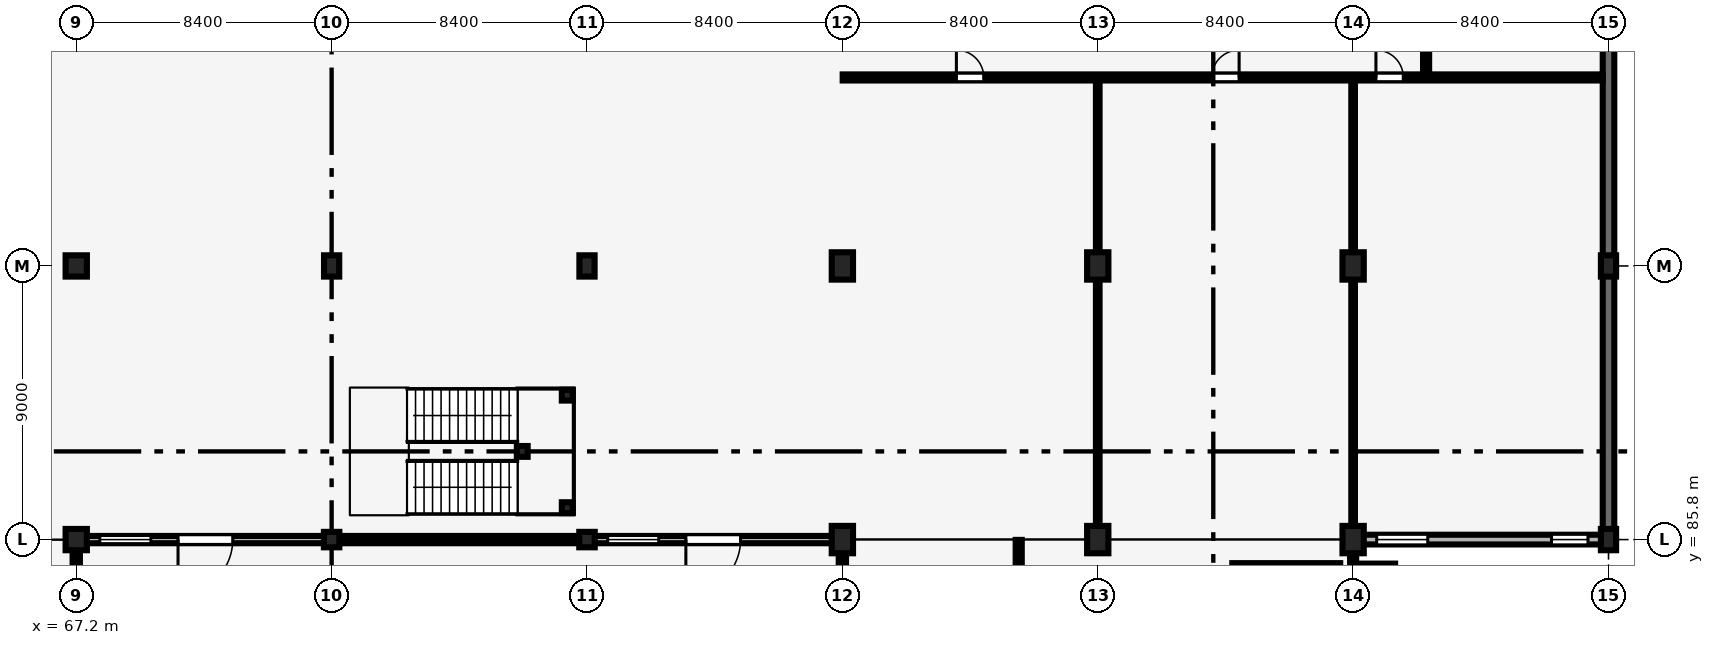
"""IFC4 building model, lengths in metres.
Left out: names, types, materials, properties, quantities, classifications, styles, units other than length and angle.
Written with IfcOpenShell. Run it as: python <this file> out.ifc"""

import sys

from ifc_helpers import new_model, si_unit, direction, frame, frame_2d, origin, origin_2d, place, context, subcontext, project, spatial, rectangle, hollow_circle, extrude, element, fill, save


model = new_model("IFC4")
c1 = context("Model", 3, precision=1e-05, world=origin(), true_north=direction((0.0, 1.0)))
c2 = subcontext(c1, "Body", "Model", "MODEL_VIEW")
j1 = project(units=[si_unit("LENGTHUNIT", "METRE"), si_unit("PLANEANGLEUNIT", "RADIAN")], contexts=[c1])
p1 = place(None, origin())
s1 = spatial("IfcSite", under=j1, at=p1, CompositionType="ELEMENT")
p2 = place(p1, origin())
s2 = spatial("IfcBuilding", under=s1, at=p2, CompositionType="ELEMENT")
p3 = place(p2, origin())
s3 = spatial("IfcBuildingStorey", under=s2, at=p3, CompositionType="ELEMENT", Elevation=0.0)
for number, where, z_axis, x_axis in (
    (1, (67.2, 85.8, 0.0), (0.0, 0.0, 1.0), (1.0, 0.0, 0.0)),
    (2, (67.2, 94.8, 0.0), (0.0, 0.0, 1.0), (1.0, 0.0, 0.0)),
):
    element("IfcColumn", number, at=place(p3, frame(where, z_axis=z_axis, x_axis=x_axis)), inside=s3, PredefinedType="COLUMN", context=c2, shape_type="SweptSolid", body=[
        extrude(rectangle(XDim=0.7, YDim=0.7, at=origin_2d()), origin(), (0.0, 0.0, 1.0), 4.8),
    ])
for number, where, z_axis, x_axis in (
    (3, (75.6, 94.8, 0.0), (0.0, 0.0, 1.0), (1.0, 0.0, 0.0)),
    (4, (84.0, 94.8, 0.0), (0.0, 0.0, 1.0), (1.0, 0.0, 0.0)),
):
    element("IfcColumn", number, at=place(p3, frame(where, z_axis=z_axis, x_axis=x_axis)), inside=s3, PredefinedType="COLUMN", context=c2, shape_type="SweptSolid", body=[
        extrude(rectangle(XDim=0.5, YDim=0.7, at=origin_2d()), origin(), (0.0, 0.0, 1.0), 4.8),
    ])
for number, where, z_axis, x_axis in (
    (5, (92.4, 85.8, 0.0), (0.0, 0.0, 1.0), (1.0, 0.0, 0.0)),
    (6, (92.4, 94.8, 0.0), (0.0, 0.0, 1.0), (1.0, 0.0, 0.0)),
    (7, (100.8, 85.8, 0.0), (0.0, 0.0, 1.0), (1.0, 0.0, 0.0)),
    (8, (100.8, 94.8, 0.0), (0.0, 0.0, 1.0), (1.0, 0.0, 0.0)),
    (9, (109.2, 85.8, 0.0), (0.0, 0.0, 1.0), (1.0, 0.0, 0.0)),
    (10, (109.2, 94.8, 0.0), (0.0, 0.0, 1.0), (1.0, 0.0, 0.0)),
):
    element("IfcColumn", number, at=place(p3, frame(where, z_axis=z_axis, x_axis=x_axis)), inside=s3, PredefinedType="COLUMN", context=c2, shape_type="SweptSolid", body=[
        extrude(rectangle(XDim=0.7, YDim=0.9, at=origin_2d()), origin(), (0.0, 0.0, 1.0), 4.8),
    ])
for number, where, z_axis, x_axis in (
    (11, (117.6, 85.8, 0.0), (0.0, 0.0, 1.0), (1.0, 0.0, 0.0)),
    (12, (117.6, 94.8, 0.0), (0.0, 0.0, 1.0), (1.0, 0.0, 0.0)),
):
    element("IfcColumn", number, at=place(p3, frame(where, z_axis=z_axis, x_axis=x_axis)), inside=s3, PredefinedType="COLUMN", context=c2, shape_type="SweptSolid", body=[
        extrude(rectangle(XDim=0.5, YDim=0.7, at=origin_2d()), origin(), (0.0, 0.0, 1.0), 4.8),
    ])
for number, where, z_axis, x_axis in (
    (13, (75.6, 85.8, 0.0), (0.0, 0.0, 1.0), (1.0, 0.0, 0.0)),
    (14, (84.0, 85.8, 0.0), (0.0, 0.0, 1.0), (1.0, 0.0, 0.0)),
):
    element("IfcColumn", number, at=place(p3, frame(where, z_axis=z_axis, x_axis=x_axis)), inside=s3, PredefinedType="USERDEFINED", context=c2, shape_type="SweptSolid", body=[
        extrude(hollow_circle(Radius=0.254, WallThickness=0.013, at=origin_2d()), origin(), (0.0, 0.0, 1.0), 4.8),
    ])
p4 = place(p3, frame((109.525, 85.8, 0.0), z_axis=(0.0, 0.0, 1.0), x_axis=(1.0, 0.0, 0.0)))
e15 = element("IfcWall", 15, at=p4, inside=s3, PredefinedType="SOLIDWALL", context=c2, shape_type="SweptSolid", body=[
    extrude(rectangle(XDim=7.85, YDim=0.32, at=frame_2d((3.925, 0.0))), origin(), (0.0, 0.0, 1.0), 3.92),
])
p5 = place(p4, frame((0.45, 0.0, 0.9)))
e16 = element("IfcOpeningElement", 16, at=p5, cuts=e15, PredefinedType="OPENING", context=c2, shape_type="SweptSolid", body=[
    extrude(rectangle(XDim=1.68, YDim=2.4, at=frame_2d((0.84, 1.2))), frame((0.0, 0.17, 0.0), z_axis=(0.0, -1.0, 0.0), x_axis=(1.0, 0.0, 0.0)), (0.0, 0.0, 1.0), 0.34),
])
p6 = place(p4, frame((6.2, 0.0, 0.9)))
e17 = element("IfcOpeningElement", 17, at=p6, cuts=e15, PredefinedType="OPENING", context=c2, shape_type="SweptSolid", body=[
    extrude(rectangle(XDim=1.2, YDim=1.5, at=frame_2d((0.6, 0.75))), frame((0.0, 0.17, 0.0), z_axis=(0.0, -1.0, 0.0), x_axis=(1.0, 0.0, 0.0)), (0.0, 0.0, 1.0), 0.34),
])
for number, where, z_axis, x_axis in (
    (18, (117.6, 86.125, 0.0), (0.0, 0.0, 1.0), (0.0, 1.0, 0.0)),
    (19, (117.6, 95.125, 0.0), (0.0, 0.0, 1.0), (0.0, 1.0, 0.0)),
):
    element("IfcWall", number, at=place(p3, frame(where, z_axis=z_axis, x_axis=x_axis)), inside=s3, PredefinedType="SHEAR", context=c2, shape_type="SweptSolid", body=[
        extrude(rectangle(XDim=8.35, YDim=0.38, at=frame_2d((4.175, 0.0))), origin(), (0.0, 0.0, 1.0), 3.57),
    ])
p7 = place(p3, frame((67.2, 77.725, 0.0), z_axis=(0.0, 0.0, 1.0), x_axis=(0.0, 1.0, 0.0)))
e20 = element("IfcWall", 20, at=p7, inside=s3, PredefinedType="SOLIDWALL", context=c2, shape_type="SweptSolid", body=[
    extrude(rectangle(XDim=7.75, YDim=0.24, at=frame_2d((3.875, 0.0))), origin(), (0.0, 0.0, 1.0), 1.15),
])
p8 = place(p3, frame((67.525, 85.8, 0.0), z_axis=(0.0, 0.0, 1.0), x_axis=(1.0, 0.0, 0.0)))
e21 = element("IfcWall", 21, at=p8, inside=s3, PredefinedType="SOLIDWALL", context=c2, shape_type="SweptSolid", body=[
    extrude(rectangle(XDim=7.846, YDim=0.24, at=frame_2d((3.923, 0.0))), origin(), (0.0, 0.0, 1.0), 3.57),
])
p9 = place(p8, frame((4.823, 0.0, 0.0), z_axis=(0.0, 0.0, 1.0), x_axis=(-1.0, 0.0, 0.0)))
e22 = element("IfcOpeningElement", 22, at=p9, cuts=e21, PredefinedType="OPENING", context=c2, shape_type="SweptSolid", body=[
    extrude(rectangle(XDim=1.8, YDim=2.35, at=frame_2d((0.9, 1.175))), frame((0.0, 0.13, 0.0), z_axis=(0.0, -1.0, 0.0), x_axis=(1.0, 0.0, 0.0)), (0.0, 0.0, 1.0), 0.26),
])
p10 = place(p8, frame((0.45, 0.0, 0.95)))
e23 = element("IfcOpeningElement", 23, at=p10, cuts=e21, PredefinedType="OPENING", context=c2, shape_type="SweptSolid", body=[
    extrude(rectangle(XDim=1.68, YDim=1.8, at=frame_2d((0.84, 0.9))), frame((0.0, 0.13, 0.0), z_axis=(0.0, -1.0, 0.0), x_axis=(1.0, 0.0, 0.0)), (0.0, 0.0, 1.0), 0.26),
])
p11 = place(p3, frame((75.829, 85.8, 0.0), z_axis=(0.0, 0.0, 1.0), x_axis=(1.0, 0.0, 0.0)))
e24 = element("IfcWall", 24, at=p11, inside=s3, PredefinedType="SOLIDWALL", context=c2, shape_type="SweptSolid", body=[
    extrude(rectangle(XDim=7.942, YDim=0.24, at=frame_2d((3.971, 0.0))), origin(), (0.0, 0.0, 1.0), 1.1),
])
p12 = place(p3, frame((84.229, 85.8, 0.0), z_axis=(0.0, 0.0, 1.0), x_axis=(1.0, 0.0, 0.0)))
e25 = element("IfcWall", 25, at=p12, inside=s3, PredefinedType="SOLIDWALL", context=c2, shape_type="SweptSolid", body=[
    extrude(rectangle(XDim=7.846, YDim=0.24, at=frame_2d((3.923, 0.0))), origin(), (0.0, 0.0, 1.0), 3.52),
])
p13 = place(p12, frame((4.823, 0.0, 0.0), z_axis=(0.0, 0.0, 1.0), x_axis=(-1.0, 0.0, 0.0)))
e26 = element("IfcOpeningElement", 26, at=p13, cuts=e25, PredefinedType="OPENING", context=c2, shape_type="SweptSolid", body=[
    extrude(rectangle(XDim=1.8, YDim=2.35, at=frame_2d((0.9, 1.175))), frame((0.0, 0.13, 0.0), z_axis=(0.0, -1.0, 0.0), x_axis=(1.0, 0.0, 0.0)), (0.0, 0.0, 1.0), 0.26),
])
p14 = place(p12, frame((0.45, 0.0, 0.95)))
e27 = element("IfcOpeningElement", 27, at=p14, cuts=e25, PredefinedType="OPENING", context=c2, shape_type="SweptSolid", body=[
    extrude(rectangle(XDim=1.68, YDim=1.8, at=frame_2d((0.84, 0.9))), frame((0.0, 0.13, 0.0), z_axis=(0.0, -1.0, 0.0), x_axis=(1.0, 0.0, 0.0)), (0.0, 0.0, 1.0), 0.26),
])
p15 = place(p3, frame((92.4, 77.825, 0.0), z_axis=(0.0, 0.0, 1.0), x_axis=(0.0, 1.0, 0.0)))
e28 = element("IfcWall", 28, at=p15, inside=s3, PredefinedType="SOLIDWALL", context=c2, shape_type="SweptSolid", body=[
    extrude(rectangle(XDim=7.55, YDim=0.24, at=frame_2d((3.775, 0.0))), origin(), (0.0, 0.0, 1.0), 1.15),
])
p16 = place(p3, frame((105.225, 84.85, 0.0), z_axis=(0.0, 0.0, 1.0), x_axis=(1.0, 0.0, 0.0)))
e29 = element("IfcWall", 29, at=p16, inside=s3, PredefinedType="SHEAR", context=c2, shape_type="SweptSolid", body=[
    extrude(rectangle(XDim=3.55, YDim=0.35, at=frame_2d((1.775, 0.0))), origin(), (0.0, 0.0, 1.0), 4.52),
])
for number, where, z_axis, x_axis in (
    (30, (83.35, 86.85, 0.0), (0.0, 0.0, 1.0), (1.0, 0.0, 0.0)),
    (31, (83.35, 90.55, 0.0), (0.0, 0.0, 1.0), (1.0, 0.0, 0.0)),
    (32, (81.87, 88.7, 0.0), (0.0, 0.0, 1.0), (1.0, 0.0, 0.0)),
):
    element("IfcColumn", number, at=place(p3, frame(where, z_axis=z_axis, x_axis=x_axis)), inside=s3, PredefinedType="USERDEFINED", context=c2, shape_type="SweptSolid", body=[
        extrude(hollow_circle(Radius=0.178, WallThickness=0.013, at=origin_2d()), origin(), (0.0, 0.0, 1.0), 2.235),
    ])
p17 = place(p3, frame((111.6, 101.01, 0.0), z_axis=(0.0, 0.0, 1.0), x_axis=(0.0, 1.0, 0.0)))
e33 = element("IfcWall", 33, at=p17, inside=s3, PredefinedType="PARTITIONING", context=c2, shape_type="SweptSolid", body=[
    extrude(rectangle(XDim=2.78, YDim=0.2, at=frame_2d((1.39, 0.0))), origin(), (0.0, 0.0, 1.0), 4.5),
])
p18 = place(p17, frame((0.94, 0.0, 0.0)))
e34 = element("IfcOpeningElement", 34, at=p18, cuts=e33, PredefinedType="OPENING", context=c2, shape_type="SweptSolid", body=[
    extrude(rectangle(XDim=0.9, YDim=2.1, at=frame_2d((0.45, 1.05))), frame((0.0, 0.11, 0.0), z_axis=(0.0, -1.0, 0.0), x_axis=(1.0, 0.0, 0.0)), (0.0, 0.0, 1.0), 0.22),
])
p19 = place(p3, frame((100.8, 86.26, 0.0), z_axis=(0.0, 0.0, 1.0), x_axis=(0.0, 1.0, 0.0)))
e35 = element("IfcWall", 35, at=p19, inside=s3, PredefinedType="PARTITIONING", context=c2, shape_type="SweptSolid", body=[
    extrude(rectangle(XDim=8.08, YDim=0.12, at=frame_2d((4.04, 0.0))), origin(), (0.0, 0.0, 1.0), 3.67),
])
p20 = place(p3, frame((100.8, 95.26, 0.0), z_axis=(0.0, 0.0, 1.0), x_axis=(0.0, 1.0, 0.0)))
e36 = element("IfcWall", 36, at=p20, inside=s3, PredefinedType="PARTITIONING", context=c2, shape_type="SweptSolid", body=[
    extrude(rectangle(XDim=5.635, YDim=0.12, at=frame_2d((2.817, 0.0))), origin(), (0.0, 0.0, 1.0), 3.62),
])
p21 = place(p3, frame((109.2, 85.965, 0.0), z_axis=(0.0, 0.0, 1.0), x_axis=(0.0, 1.0, 0.0)))
e37 = element("IfcWall", 37, at=p21, inside=s3, PredefinedType="PARTITIONING", context=c2, shape_type="SweptSolid", body=[
    extrude(rectangle(XDim=8.375, YDim=0.12, at=frame_2d((4.188, 0.0))), origin(), (0.0, 0.0, 1.0), 3.77),
])
p22 = place(p3, frame((109.2, 95.26, 0.0), z_axis=(0.0, 0.0, 1.0), x_axis=(0.0, 1.0, 0.0)))
e38 = element("IfcWall", 38, at=p22, inside=s3, PredefinedType="PARTITIONING", context=c2, shape_type="SweptSolid", body=[
    extrude(rectangle(XDim=5.635, YDim=0.12, at=frame_2d((2.817, 0.0))), origin(), (0.0, 0.0, 1.0), 3.72),
])
p23 = place(p3, frame((92.41, 101.0, 0.0), z_axis=(0.0, 0.0, 1.0), x_axis=(1.0, 0.0, 0.0)))
e39 = element("IfcWall", 39, at=p23, inside=s3, PredefinedType="PARTITIONING", context=c2, shape_type="SweptSolid", body=[
    extrude(rectangle(XDim=24.995, YDim=0.2, at=frame_2d((12.498, 0.0))), origin(), (0.0, 0.0, 1.0), 4.04),
])
p24 = place(p23, frame((3.74, 0.0, 0.0)))
e40 = element("IfcOpeningElement", 40, at=p24, cuts=e39, PredefinedType="OPENING", context=c2, shape_type="SweptSolid", body=[
    extrude(rectangle(XDim=0.9, YDim=2.1, at=frame_2d((0.45, 1.05))), frame((0.0, 0.11, 0.0), z_axis=(0.0, -1.0, 0.0), x_axis=(1.0, 0.0, 0.0)), (0.0, 0.0, 1.0), 0.22),
])
p25 = place(p23, frame((12.14, 0.0, 0.0)))
e41 = element("IfcOpeningElement", 41, at=p25, cuts=e39, PredefinedType="OPENING", context=c2, shape_type="SweptSolid", body=[
    extrude(rectangle(XDim=0.9, YDim=2.1, at=frame_2d((0.45, 1.05))), frame((0.0, 0.11, 0.0), z_axis=(0.0, -1.0, 0.0), x_axis=(1.0, 0.0, 0.0)), (0.0, 0.0, 1.0), 0.22),
])
p26 = place(p23, frame((17.54, 0.0, 0.0)))
e42 = element("IfcOpeningElement", 42, at=p26, cuts=e39, PredefinedType="OPENING", context=c2, shape_type="SweptSolid", body=[
    extrude(rectangle(XDim=0.9, YDim=2.1, at=frame_2d((0.45, 1.05))), frame((0.0, 0.11, 0.0), z_axis=(0.0, -1.0, 0.0), x_axis=(1.0, 0.0, 0.0)), (0.0, 0.0, 1.0), 0.22),
])
p27 = place(p3, frame((98.2, 18.01, 0.0), z_axis=(0.0, 0.0, 1.0), x_axis=(0.0, 1.0, 0.0)))
e43 = element("IfcWall", 43, at=p27, inside=s3, PredefinedType="PARTITIONING", context=c2, shape_type="SweptSolid", body=[
    extrude(rectangle(XDim=67.78, YDim=0.2, at=frame_2d((33.89, 0.0))), origin(), (0.0, 0.0, 1.0), 4.5),
])
p28 = place(p27, frame((3.24, 0.0, 0.0)))
e44 = element("IfcOpeningElement", 44, at=p28, cuts=e43, PredefinedType="OPENING", context=c2, shape_type="SweptSolid", body=[
    extrude(rectangle(XDim=1.7, YDim=2.25, at=frame_2d((0.85, 1.125))), frame((0.0, 0.11, 0.0), z_axis=(0.0, -1.0, 0.0), x_axis=(1.0, 0.0, 0.0)), (0.0, 0.0, 1.0), 0.22),
])
p29 = place(p27, frame((12.965, 0.0, 0.0)))
e45 = element("IfcOpeningElement", 45, at=p29, cuts=e43, PredefinedType="OPENING", context=c2, shape_type="SweptSolid", body=[
    extrude(rectangle(XDim=1.05, YDim=2.2, at=frame_2d((0.525, 1.1))), frame((0.0, 0.11, 0.0), z_axis=(0.0, -1.0, 0.0), x_axis=(1.0, 0.0, 0.0)), (0.0, 0.0, 1.0), 0.22),
])
p30 = place(p27, frame((21.94, 0.0, 0.0)))
e46 = element("IfcOpeningElement", 46, at=p30, cuts=e43, PredefinedType="OPENING", context=c2, shape_type="SweptSolid", body=[
    extrude(rectangle(XDim=1.1, YDim=2.15, at=frame_2d((0.55, 1.075))), frame((0.0, 0.11, 0.0), z_axis=(0.0, -1.0, 0.0), x_axis=(1.0, 0.0, 0.0)), (0.0, 0.0, 1.0), 0.22),
])
p31 = place(p27, frame((28.515, 0.0, 0.0)))
e47 = element("IfcOpeningElement", 47, at=p31, cuts=e43, PredefinedType="OPENING", context=c2, shape_type="SweptSolid", body=[
    extrude(rectangle(XDim=0.95, YDim=2.2, at=frame_2d((0.475, 1.1))), frame((0.0, 0.11, 0.0), z_axis=(0.0, -1.0, 0.0), x_axis=(1.0, 0.0, 0.0)), (0.0, 0.0, 1.0), 0.22),
])
p32 = place(p27, frame((34.115, 0.0, 0.0)))
e48 = element("IfcOpeningElement", 48, at=p32, cuts=e43, PredefinedType="OPENING", context=c2, shape_type="SweptSolid", body=[
    extrude(rectangle(XDim=0.95, YDim=2.2, at=frame_2d((0.475, 1.1))), frame((0.0, 0.11, 0.0), z_axis=(0.0, -1.0, 0.0), x_axis=(1.0, 0.0, 0.0)), (0.0, 0.0, 1.0), 0.22),
])
p33 = place(p27, frame((39.015, 0.0, 0.0)))
e49 = element("IfcOpeningElement", 49, at=p33, cuts=e43, PredefinedType="OPENING", context=c2, shape_type="SweptSolid", body=[
    extrude(rectangle(XDim=0.95, YDim=2.1, at=frame_2d((0.475, 1.05))), frame((0.0, 0.11, 0.0), z_axis=(0.0, -1.0, 0.0), x_axis=(1.0, 0.0, 0.0)), (0.0, 0.0, 1.0), 0.22),
])
p34 = place(p27, frame((47.19, 0.0, 0.0)))
e50 = element("IfcOpeningElement", 50, at=p34, cuts=e43, PredefinedType="OPENING", context=c2, shape_type="SweptSolid", body=[
    extrude(rectangle(XDim=1.0, YDim=2.25, at=frame_2d((0.5, 1.125))), frame((0.0, 0.11, 0.0), z_axis=(0.0, -1.0, 0.0), x_axis=(1.0, 0.0, 0.0)), (0.0, 0.0, 1.0), 0.22),
])
p35 = place(p27, frame((60.24, 0.0, 0.0)))
e51 = element("IfcOpeningElement", 51, at=p35, cuts=e43, PredefinedType="OPENING", context=c2, shape_type="SweptSolid", body=[
    extrude(rectangle(XDim=1.1, YDim=2.15, at=frame_2d((0.55, 1.075))), frame((0.0, 0.11, 0.0), z_axis=(0.0, -1.0, 0.0), x_axis=(1.0, 0.0, 0.0)), (0.0, 0.0, 1.0), 0.22),
])
p36 = place(p5, origin())
e52 = element("IfcWindow", 52, at=p36, inside=s3, PartitioningType="SINGLE_PANEL", PredefinedType="WINDOW", context=c2, shape_type="SweptSolid", body=[
    extrude(rectangle(XDim=1.68, YDim=2.4, at=frame_2d((0.84, 1.2))), frame((0.0, 0.03, 0.0), z_axis=(0.0, -1.0, 0.0), x_axis=(1.0, 0.0, 0.0)), (0.0, 0.0, 1.0), 0.06),
])
fill(e16, e52)
p37 = place(p6, origin())
e53 = element("IfcWindow", 53, at=p37, inside=s3, PartitioningType="SINGLE_PANEL", PredefinedType="WINDOW", context=c2, shape_type="SweptSolid", body=[
    extrude(rectangle(XDim=1.2, YDim=1.5, at=frame_2d((0.6, 0.75))), frame((0.0, 0.03, 0.0), z_axis=(0.0, -1.0, 0.0), x_axis=(1.0, 0.0, 0.0)), (0.0, 0.0, 1.0), 0.06),
])
fill(e17, e53)
p38 = place(p9, origin())
e54 = element("IfcDoor", 54, at=p38, inside=s3, OperationType="DOUBLE_DOOR_SINGLE_SWING", PredefinedType="DOOR", context=c2, shape_type="SweptSolid", body=[
    extrude(rectangle(XDim=1.8, YDim=2.35, at=frame_2d((0.9, 1.175))), frame((0.0, 0.025, 0.0), z_axis=(0.0, -1.0, 0.0), x_axis=(1.0, 0.0, 0.0)), (0.0, 0.0, 1.0), 0.05),
])
fill(e22, e54)
p39 = place(p10, origin())
e55 = element("IfcWindow", 55, at=p39, inside=s3, PartitioningType="SINGLE_PANEL", PredefinedType="WINDOW", context=c2, shape_type="SweptSolid", body=[
    extrude(rectangle(XDim=1.68, YDim=1.8, at=frame_2d((0.84, 0.9))), frame((0.0, 0.03, 0.0), z_axis=(0.0, -1.0, 0.0), x_axis=(1.0, 0.0, 0.0)), (0.0, 0.0, 1.0), 0.06),
])
fill(e23, e55)
p40 = place(p13, origin())
e56 = element("IfcDoor", 56, at=p40, inside=s3, OperationType="DOUBLE_DOOR_SINGLE_SWING", PredefinedType="DOOR", context=c2, shape_type="SweptSolid", body=[
    extrude(rectangle(XDim=1.8, YDim=2.35, at=frame_2d((0.9, 1.175))), frame((0.0, 0.025, 0.0), z_axis=(0.0, -1.0, 0.0), x_axis=(1.0, 0.0, 0.0)), (0.0, 0.0, 1.0), 0.05),
])
fill(e26, e56)
p41 = place(p14, origin())
e57 = element("IfcWindow", 57, at=p41, inside=s3, PartitioningType="SINGLE_PANEL", PredefinedType="WINDOW", context=c2, shape_type="SweptSolid", body=[
    extrude(rectangle(XDim=1.68, YDim=1.8, at=frame_2d((0.84, 0.9))), frame((0.0, 0.03, 0.0), z_axis=(0.0, -1.0, 0.0), x_axis=(1.0, 0.0, 0.0)), (0.0, 0.0, 1.0), 0.06),
])
fill(e27, e57)
p42 = place(p24, origin())
e58 = element("IfcDoor", 58, at=p42, inside=s3, OperationType="SINGLE_SWING_LEFT", PredefinedType="DOOR", context=c2, shape_type="SweptSolid", body=[
    extrude(rectangle(XDim=0.9, YDim=2.1, at=frame_2d((0.45, 1.05))), frame((0.0, 0.025, 0.0), z_axis=(0.0, -1.0, 0.0), x_axis=(1.0, 0.0, 0.0)), (0.0, 0.0, 1.0), 0.05),
])
fill(e40, e58)
p43 = place(p25, origin())
e59 = element("IfcDoor", 59, at=p43, inside=s3, OperationType="SINGLE_SWING_RIGHT", PredefinedType="DOOR", context=c2, shape_type="SweptSolid", body=[
    extrude(rectangle(XDim=0.9, YDim=2.1, at=frame_2d((0.45, 1.05))), frame((0.0, 0.025, 0.0), z_axis=(0.0, -1.0, 0.0), x_axis=(1.0, 0.0, 0.0)), (0.0, 0.0, 1.0), 0.05),
])
fill(e41, e59)
p44 = place(p26, origin())
e60 = element("IfcDoor", 60, at=p44, inside=s3, OperationType="SINGLE_SWING_LEFT", PredefinedType="DOOR", context=c2, shape_type="SweptSolid", body=[
    extrude(rectangle(XDim=0.9, YDim=2.1, at=frame_2d((0.45, 1.05))), frame((0.0, 0.025, 0.0), z_axis=(0.0, -1.0, 0.0), x_axis=(1.0, 0.0, 0.0)), (0.0, 0.0, 1.0), 0.05),
])
fill(e42, e60)
save(model, sys.argv[1])
